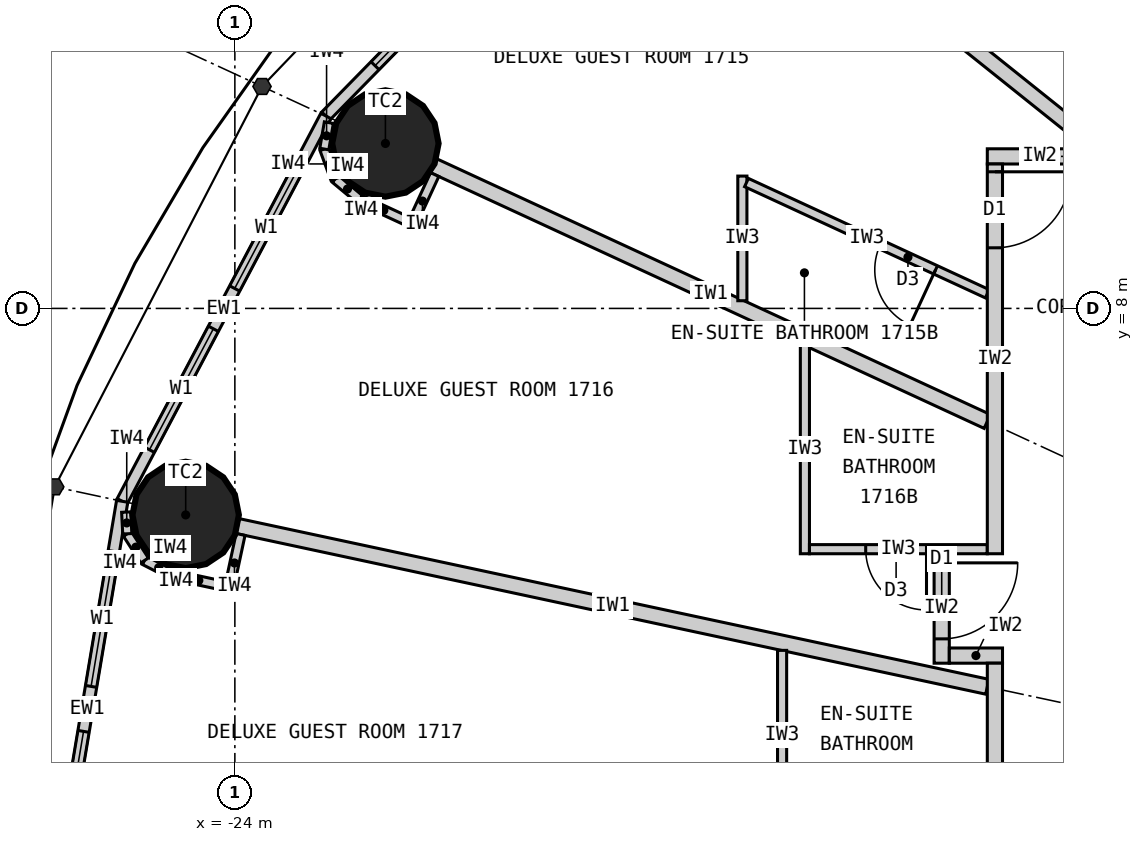
"""IFC4 building model, lengths in metres.
Left out: names, types, materials, properties, quantities, classifications, styles, units other than length and angle.
Written with IfcOpenShell. Run it as: python <this file> out.ifc"""

import sys

from ifc_helpers import new_model, si_unit, direction, frame, frame_2d, origin, origin_2d, place, context, subcontext, project, spatial, rectangle, circle, extrude, element, fill, save


model = new_model("IFC4")
c1 = context("Model", 3, precision=1e-05, world=origin(), true_north=direction((0.0, 1.0)))
c2 = subcontext(c1, "Body", "Model", "MODEL_VIEW")
j1 = project(units=[si_unit("LENGTHUNIT", "METRE"), si_unit("PLANEANGLEUNIT", "RADIAN")], contexts=[c1])
p1 = place(None, origin())
s1 = spatial("IfcSite", under=j1, at=p1, CompositionType="ELEMENT")
p2 = place(p1, origin())
s2 = spatial("IfcBuilding", under=s1, at=p2, CompositionType="ELEMENT")
p3 = place(p2, frame((0.0, 0.0, 70.5)))
s3 = spatial("IfcBuildingStorey", under=s2, at=p3, CompositionType="ELEMENT", Elevation=70.5)
for number, where, z_axis, x_axis in (
    (1, (-22.019, 10.17, 0.0), (0.0, 0.0, 1.0), (1.0, 0.0, 0.0)),
    (2, (-24.647, 5.283, 0.0), (0.0, 0.0, 1.0), (1.0, 0.0, 0.0)),
):
    element("IfcColumn", number, at=place(p3, frame(where, z_axis=z_axis, x_axis=x_axis)), inside=s3, PredefinedType="COLUMN", context=c2, shape_type="SweptSolid", body=[
        extrude(circle(Radius=0.7, at=origin_2d()), origin(), (0.0, 0.0, 1.0), 3.3),
    ])
p4 = place(p3, frame((-18.57, 14.856, 0.0), z_axis=(0.0, 0.0, 1.0), x_axis=(-0.699602905915, -0.714531856557, 0.0)))
e3 = element("IfcWall", 3, at=p4, inside=s3, PredefinedType="ELEMENTEDWALL", context=c2, shape_type="SweptSolid", body=[
    extrude(rectangle(XDim=6.051, YDim=0.15, at=frame_2d((3.025, 0.0))), origin(), (0.0, 0.0, 1.0), 3.12),
])
p5 = place(p4, frame((0.926, 0.0, 0.9)))
e4 = element("IfcOpeningElement", 4, at=p5, cuts=e3, PredefinedType="OPENING", context=c2, shape_type="SweptSolid", body=[
    extrude(rectangle(XDim=1.8, YDim=1.9, at=frame_2d((0.9, 0.95))), frame((0.0, 0.085, 0.0), z_axis=(0.0, -1.0, 0.0), x_axis=(1.0, 0.0, 0.0)), (0.0, 0.0, 1.0), 0.17),
])
p6 = place(p4, frame((3.325, 0.0, 0.9)))
e5 = element("IfcOpeningElement", 5, at=p6, cuts=e3, PredefinedType="OPENING", context=c2, shape_type="SweptSolid", body=[
    extrude(rectangle(XDim=1.8, YDim=1.9, at=frame_2d((0.9, 0.95))), frame((0.0, 0.085, 0.0), z_axis=(0.0, -1.0, 0.0), x_axis=(1.0, 0.0, 0.0)), (0.0, 0.0, 1.0), 0.17),
])
p7 = place(p3, frame((-22.803, 10.532, 0.0), z_axis=(0.0, 0.0, 1.0), x_axis=(-0.467296867008, -0.884100468321, 0.0)))
e6 = element("IfcWall", 6, at=p7, inside=s3, PredefinedType="ELEMENTEDWALL", context=c2, shape_type="SweptSolid", body=[
    extrude(rectangle(XDim=5.734, YDim=0.15, at=frame_2d((2.867, 0.0))), origin(), (0.0, 0.0, 1.0), 3.12),
])
p8 = place(p7, frame((0.767, 0.0, 0.9)))
e7 = element("IfcOpeningElement", 7, at=p8, cuts=e6, PredefinedType="OPENING", context=c2, shape_type="SweptSolid", body=[
    extrude(rectangle(XDim=1.8, YDim=1.9, at=frame_2d((0.9, 0.95))), frame((0.0, 0.085, 0.0), z_axis=(0.0, -1.0, 0.0), x_axis=(1.0, 0.0, 0.0)), (0.0, 0.0, 1.0), 0.17),
])
p9 = place(p7, frame((3.167, 0.0, 0.9)))
e8 = element("IfcOpeningElement", 8, at=p9, cuts=e6, PredefinedType="OPENING", context=c2, shape_type="SweptSolid", body=[
    extrude(rectangle(XDim=1.8, YDim=1.9, at=frame_2d((0.9, 0.95))), frame((0.0, 0.085, 0.0), z_axis=(0.0, -1.0, 0.0), x_axis=(1.0, 0.0, 0.0)), (0.0, 0.0, 1.0), 0.17),
])
p10 = place(p3, frame((-25.482, 5.462, 0.0), z_axis=(0.0, 0.0, 1.0), x_axis=(-0.165642551694, -0.986185857264, 0.0)))
e9 = element("IfcWall", 9, at=p10, inside=s3, PredefinedType="ELEMENTEDWALL", context=c2, shape_type="SweptSolid", body=[
    extrude(rectangle(XDim=5.539, YDim=0.15, at=frame_2d((2.77, 0.0))), origin(), (0.0, 0.0, 1.0), 3.12),
])
p11 = place(p10, frame((0.669, 0.0, 0.9)))
e10 = element("IfcOpeningElement", 10, at=p11, cuts=e9, PredefinedType="OPENING", context=c2, shape_type="SweptSolid", body=[
    extrude(rectangle(XDim=1.8, YDim=1.9, at=frame_2d((0.9, 0.95))), frame((0.0, 0.085, 0.0), z_axis=(0.0, -1.0, 0.0), x_axis=(1.0, 0.0, 0.0)), (0.0, 0.0, 1.0), 0.17),
])
p12 = place(p10, frame((3.07, 0.0, 0.9)))
e11 = element("IfcOpeningElement", 11, at=p12, cuts=e9, PredefinedType="OPENING", context=c2, shape_type="SweptSolid", body=[
    extrude(rectangle(XDim=1.8, YDim=1.9, at=frame_2d((0.9, 0.95))), frame((0.0, 0.085, 0.0), z_axis=(0.0, -1.0, 0.0), x_axis=(1.0, 0.0, 0.0)), (0.0, 0.0, 1.0), 0.17),
])
p13 = place(p3, frame((-12.625, 10.1, 0.0), z_axis=(0.0, 0.0, 1.0), x_axis=(-0.780892451574, 0.624665493744, 0.0)))
e12 = element("IfcWall", 12, at=p13, inside=s3, PredefinedType="PARTITIONING", context=c2, shape_type="SweptSolid", body=[
    extrude(rectangle(XDim=6.045, YDim=0.2, at=frame_2d((3.022, 0.0))), origin(), (0.0, 0.0, 1.0), 2.32),
])
p14 = place(p3, frame((-14.1, 6.512, 0.0), z_axis=(0.0, 0.0, 1.0), x_axis=(-0.907832871056, 0.419332181247, 0.0)))
e13 = element("IfcWall", 13, at=p14, inside=s3, PredefinedType="PARTITIONING", context=c2, shape_type="SweptSolid", body=[
    extrude(rectangle(XDim=8.023, YDim=0.2, at=frame_2d((4.011, 0.0))), origin(), (0.0, 0.0, 1.0), 2.32),
])
p15 = place(p3, frame((-14.1, 3.022, 0.0), z_axis=(0.0, 0.0, 1.0), x_axis=(-0.977790014929, 0.209586943072, 0.0)))
e14 = element("IfcWall", 14, at=p15, inside=s3, PredefinedType="PARTITIONING", context=c2, shape_type="SweptSolid", body=[
    extrude(rectangle(XDim=10.087, YDim=0.2, at=frame_2d((5.043, 0.0))), origin(), (0.0, 0.0, 1.0), 2.32),
])
p16 = place(p3, frame((-17.323, 8.101, 0.0), z_axis=(0.0, 0.0, 1.0), x_axis=(0.0, 1.0, 0.0)))
e15 = element("IfcWall", 15, at=p16, inside=s3, PredefinedType="PARTITIONING", context=c2, shape_type="SweptSolid", body=[
    extrude(rectangle(XDim=1.64, YDim=0.12, at=frame_2d((0.82, 0.0))), origin(), (0.0, 0.0, 1.0), 3.12),
])
p17 = place(p3, frame((-14.1, 8.193, 0.0), z_axis=(0.0, 0.0, 1.0), x_axis=(-0.907836493557, 0.419324338628, 0.0)))
e16 = element("IfcWall", 16, at=p17, inside=s3, PredefinedType="PARTITIONING", context=c2, shape_type="SweptSolid", body=[
    extrude(rectangle(XDim=3.49, YDim=0.12, at=frame_2d((1.745, 0.0))), origin(), (0.0, 0.0, 1.0), 3.12),
])
p18 = place(p17, frame((0.75, 0.0, 0.0)))
e17 = element("IfcOpeningElement", 17, at=p18, cuts=e16, PredefinedType="OPENING", context=c2, shape_type="SweptSolid", body=[
    extrude(rectangle(XDim=0.8, YDim=2.1, at=frame_2d((0.4, 1.05))), frame((0.0, 0.07, 0.0), z_axis=(0.0, -1.0, 0.0), x_axis=(1.0, 0.0, 0.0)), (0.0, 0.0, 1.0), 0.14),
])
p19 = place(p3, frame((-16.5, 7.521, 0.0), z_axis=(0.0, 0.0, 1.0), x_axis=(0.0, -1.0, 0.0)))
e18 = element("IfcWall", 18, at=p19, inside=s3, PredefinedType="PARTITIONING", context=c2, shape_type="SweptSolid", body=[
    extrude(rectangle(XDim=2.749, YDim=0.12, at=frame_2d((1.374, 0.0))), origin(), (0.0, 0.0, 1.0), 3.12),
])
p20 = place(p3, frame((-14.1, 4.833, 0.0), z_axis=(0.0, 0.0, 1.0), x_axis=(-1.0, 0.0, 0.0)))
e19 = element("IfcWall", 19, at=p20, inside=s3, PredefinedType="PARTITIONING", context=c2, shape_type="SweptSolid", body=[
    extrude(rectangle(XDim=2.34, YDim=0.12, at=frame_2d((1.17, 0.0))), origin(), (0.0, 0.0, 1.0), 3.12),
])
p21 = place(p20, frame((0.8, 0.0, 0.0)))
e20 = element("IfcOpeningElement", 20, at=p21, cuts=e19, PredefinedType="OPENING", context=c2, shape_type="SweptSolid", body=[
    extrude(rectangle(XDim=0.8, YDim=2.1, at=frame_2d((0.4, 1.05))), frame((0.0, 0.07, 0.0), z_axis=(0.0, -1.0, 0.0), x_axis=(1.0, 0.0, 0.0)), (0.0, 0.0, 1.0), 0.14),
])
p22 = place(p3, frame((-16.8, 3.501, 0.0), z_axis=(0.0, 0.0, 1.0), x_axis=(0.0, -1.0, 0.0)))
e21 = element("IfcWall", 21, at=p22, inside=s3, PredefinedType="PARTITIONING", context=c2, shape_type="SweptSolid", body=[
    extrude(rectangle(XDim=2.219, YDim=0.12, at=frame_2d((1.109, 0.0))), origin(), (0.0, 0.0, 1.0), 3.12),
])
p23 = place(p3, frame((-14.7, 4.772, 0.0), z_axis=(0.0, 0.0, 1.0), x_axis=(0.0, -1.0, 0.0)))
e22 = element("IfcWall", 22, at=p23, inside=s3, PredefinedType="PARTITIONING", context=c2, shape_type="SweptSolid", body=[
    extrude(rectangle(XDim=1.44, YDim=0.2, at=frame_2d((0.72, 0.0))), origin(), (0.0, 0.0, 1.0), 3.12),
])
p24 = place(p23, frame((0.12, 0.0, 0.0)))
e23 = element("IfcOpeningElement", 23, at=p24, cuts=e22, PredefinedType="OPENING", context=c2, shape_type="SweptSolid", body=[
    extrude(rectangle(XDim=1.0, YDim=2.2, at=frame_2d((0.5, 1.1))), frame((0.0, 0.11, 0.0), z_axis=(0.0, -1.0, 0.0), x_axis=(1.0, 0.0, 0.0)), (0.0, 0.0, 1.0), 0.22),
])
p25 = place(p3, frame((-13.9, 3.433, 0.0), z_axis=(0.0, 0.0, 1.0), x_axis=(-1.0, 0.0, 0.0)))
e24 = element("IfcWall", 24, at=p25, inside=s3, PredefinedType="PARTITIONING", context=c2, shape_type="SweptSolid", body=[
    extrude(rectangle(XDim=0.7, YDim=0.2, at=frame_2d((0.35, 0.0))), origin(), (0.0, 0.0, 1.0), 2.32),
])
p26 = place(p3, frame((-14.1, 10.0, 0.0), z_axis=(0.0, 0.0, 1.0), x_axis=(1.0, 0.0, 0.0)))
e25 = element("IfcWall", 25, at=p26, inside=s3, PredefinedType="PARTITIONING", context=c2, shape_type="SweptSolid", body=[
    extrude(rectangle(XDim=2.481, YDim=0.2, at=frame_2d((1.24, 0.0))), origin(), (0.0, 0.0, 1.0), 3.12),
])
p27 = place(p3, frame((-14.0, 9.9, 0.0), z_axis=(0.0, 0.0, 1.0), x_axis=(0.0, -1.0, 0.0)))
e26 = element("IfcWall", 26, at=p27, inside=s3, PredefinedType="PARTITIONING", context=c2, shape_type="SweptSolid", body=[
    extrude(rectangle(XDim=5.127, YDim=0.2, at=frame_2d((2.564, 0.0))), origin(), (0.0, 0.0, 1.0), 3.12),
])
p28 = place(p27, frame((0.103, 0.0, 0.0)))
e27 = element("IfcOpeningElement", 27, at=p28, cuts=e26, PredefinedType="OPENING", context=c2, shape_type="SweptSolid", body=[
    extrude(rectangle(XDim=1.0, YDim=2.2, at=frame_2d((0.5, 1.1))), frame((0.0, 0.11, 0.0), z_axis=(0.0, -1.0, 0.0), x_axis=(1.0, 0.0, 0.0)), (0.0, 0.0, 1.0), 0.22),
])
p29 = place(p3, frame((-14.0, 3.333, 0.0), z_axis=(0.0, 0.0, 1.0), x_axis=(0.0, -1.0, 0.0)))
e28 = element("IfcWall", 28, at=p29, inside=s3, PredefinedType="PARTITIONING", context=c2, shape_type="SweptSolid", body=[
    extrude(rectangle(XDim=6.665, YDim=0.2, at=frame_2d((3.333, 0.0))), origin(), (0.0, 0.0, 1.0), 3.12),
])
p30 = place(p29, frame((2.15, 0.0, 0.0)))
e29 = element("IfcOpeningElement", 29, at=p30, cuts=e28, PredefinedType="OPENING", context=c2, shape_type="SweptSolid", body=[
    extrude(rectangle(XDim=1.0, YDim=2.2, at=frame_2d((0.5, 1.1))), frame((0.0, 0.11, 0.0), z_axis=(0.0, -1.0, 0.0), x_axis=(1.0, 0.0, 0.0)), (0.0, 0.0, 1.0), 0.22),
])
p31 = place(p29, frame((5.173, 0.0, 0.0)))
e30 = element("IfcOpeningElement", 30, at=p31, cuts=e28, PredefinedType="OPENING", context=c2, shape_type="SweptSolid", body=[
    extrude(rectangle(XDim=1.0, YDim=2.2, at=frame_2d((0.5, 1.1))), frame((0.0, 0.11, 0.0), z_axis=(0.0, -1.0, 0.0), x_axis=(1.0, 0.0, 0.0)), (0.0, 0.0, 1.0), 0.22),
])
p32 = place(p3, frame((-21.371, 9.761, 0.0), z_axis=(0.0, 0.0, 1.0), x_axis=(-0.419259891039, -0.907866258744, 0.0)))
e31 = element("IfcWall", 31, at=p32, inside=s3, PredefinedType="PARTITIONING", context=c2, shape_type="SweptSolid", body=[
    extrude(rectangle(XDim=0.768, YDim=0.12, at=frame_2d((0.384, 0.0))), origin(), (0.0, 0.0, 1.0), 3.12),
])
p33 = place(p3, frame((-21.722, 9.144, 0.0), z_axis=(0.0, 0.0, 1.0), x_axis=(-0.907877701396, 0.419235112208, 0.0)))
e32 = element("IfcWall", 32, at=p33, inside=s3, PredefinedType="PARTITIONING", context=c2, shape_type="SweptSolid", body=[
    extrude(rectangle(XDim=0.7, YDim=0.12, at=frame_2d((0.35, 0.0))), origin(), (0.0, 0.0, 1.0), 3.12),
])
p34 = place(p3, frame((-22.358, 9.437, 0.0), z_axis=(0.0, 0.0, 1.0), x_axis=(-0.768412687942, 0.639954639806, 0.0)))
e33 = element("IfcWall", 33, at=p34, inside=s3, PredefinedType="PARTITIONING", context=c2, shape_type="SweptSolid", body=[
    extrude(rectangle(XDim=0.418, YDim=0.12, at=frame_2d((0.209, 0.0))), origin(), (0.0, 0.0, 1.0), 3.12),
])
p35 = place(p3, frame((-22.679, 9.705, 0.0), z_axis=(0.0, 0.0, 1.0), x_axis=(-0.345164001646, 0.938542386879, 0.0)))
e34 = element("IfcWall", 34, at=p35, inside=s3, PredefinedType="PARTITIONING", context=c2, shape_type="SweptSolid", body=[
    extrude(rectangle(XDim=0.418, YDim=0.12, at=frame_2d((0.209, 0.0))), origin(), (0.0, 0.0, 1.0), 3.12),
])
p36 = place(p3, frame((-22.823, 10.097, 0.0), z_axis=(0.0, 0.0, 1.0), x_axis=(0.169674995186, 0.985500074079, 0.0)))
e35 = element("IfcWall", 35, at=p36, inside=s3, PredefinedType="PARTITIONING", context=c2, shape_type="SweptSolid", body=[
    extrude(rectangle(XDim=0.353, YDim=0.12, at=frame_2d((0.176, 0.0))), origin(), (0.0, 0.0, 1.0), 3.12),
])
p37 = place(p3, frame((-23.925, 5.026, 0.0), z_axis=(0.0, 0.0, 1.0), x_axis=(-0.209681192172, -0.977769808109, 0.0)))
e36 = element("IfcWall", 36, at=p37, inside=s3, PredefinedType="PARTITIONING", context=c2, shape_type="SweptSolid", body=[
    extrude(rectangle(XDim=0.767, YDim=0.12, at=frame_2d((0.384, 0.0))), origin(), (0.0, 0.0, 1.0), 3.12),
])
p38 = place(p3, frame((-24.132, 4.347, 0.0), z_axis=(0.0, 0.0, 1.0), x_axis=(-0.977776882509, 0.209648200638, 0.0)))
e37 = element("IfcWall", 37, at=p38, inside=s3, PredefinedType="PARTITIONING", context=c2, shape_type="SweptSolid", body=[
    extrude(rectangle(XDim=0.7, YDim=0.12, at=frame_2d((0.35, 0.0))), origin(), (0.0, 0.0, 1.0), 3.12),
])
for number, where, z_axis, x_axis in (
    (38, (-24.816, 4.494, 0.0), (0.0, 0.0, 1.0), (-0.89, 0.455, 0.0)),
    (39, (-25.188, 4.684, 0.0), (0.0, 0.0, 1.0), (-0.543, 0.84, 0.0)),
):
    element("IfcWall", number, at=place(p3, frame(where, z_axis=z_axis, x_axis=x_axis)), inside=s3, PredefinedType="PARTITIONING", context=c2, shape_type="SweptSolid", body=[
        extrude(rectangle(XDim=0.418, YDim=0.12, at=frame_2d((0.209, 0.0))), origin(), (0.0, 0.0, 1.0), 3.12),
    ])
p39 = place(p3, frame((-25.416, 5.035, 0.0), z_axis=(0.0, 0.0, 1.0), x_axis=(-0.050406329159, 0.998728793007, 0.0)))
e40 = element("IfcWall", 40, at=p39, inside=s3, PredefinedType="PARTITIONING", context=c2, shape_type="SweptSolid", body=[
    extrude(rectangle(XDim=0.286, YDim=0.12, at=frame_2d((0.143, 0.0))), origin(), (0.0, 0.0, 1.0), 3.12),
])
p40 = place(p6, origin())
e41 = element("IfcWindow", 41, at=p40, inside=s3, PartitioningType="SINGLE_PANEL", PredefinedType="WINDOW", context=c2, shape_type="SweptSolid", body=[
    extrude(rectangle(XDim=1.8, YDim=1.9, at=frame_2d((0.9, 0.95))), frame((0.0, 0.03, 0.0), z_axis=(0.0, -1.0, 0.0), x_axis=(1.0, 0.0, 0.0)), (0.0, 0.0, 1.0), 0.06),
])
fill(e5, e41)
p41 = place(p8, origin())
e42 = element("IfcWindow", 42, at=p41, inside=s3, PartitioningType="SINGLE_PANEL", PredefinedType="WINDOW", context=c2, shape_type="SweptSolid", body=[
    extrude(rectangle(XDim=1.8, YDim=1.9, at=frame_2d((0.9, 0.95))), frame((0.0, 0.03, 0.0), z_axis=(0.0, -1.0, 0.0), x_axis=(1.0, 0.0, 0.0)), (0.0, 0.0, 1.0), 0.06),
])
fill(e7, e42)
p42 = place(p9, origin())
e43 = element("IfcWindow", 43, at=p42, inside=s3, PartitioningType="SINGLE_PANEL", PredefinedType="WINDOW", context=c2, shape_type="SweptSolid", body=[
    extrude(rectangle(XDim=1.8, YDim=1.9, at=frame_2d((0.9, 0.95))), frame((0.0, 0.03, 0.0), z_axis=(0.0, -1.0, 0.0), x_axis=(1.0, 0.0, 0.0)), (0.0, 0.0, 1.0), 0.06),
])
fill(e8, e43)
p43 = place(p11, origin())
e44 = element("IfcWindow", 44, at=p43, inside=s3, PartitioningType="SINGLE_PANEL", PredefinedType="WINDOW", context=c2, shape_type="SweptSolid", body=[
    extrude(rectangle(XDim=1.8, YDim=1.9, at=frame_2d((0.9, 0.95))), frame((0.0, 0.03, 0.0), z_axis=(0.0, -1.0, 0.0), x_axis=(1.0, 0.0, 0.0)), (0.0, 0.0, 1.0), 0.06),
])
fill(e10, e44)
p44 = place(p12, origin())
e45 = element("IfcWindow", 45, at=p44, inside=s3, PartitioningType="SINGLE_PANEL", PredefinedType="WINDOW", context=c2, shape_type="SweptSolid", body=[
    extrude(rectangle(XDim=1.8, YDim=1.9, at=frame_2d((0.9, 0.95))), frame((0.0, 0.03, 0.0), z_axis=(0.0, -1.0, 0.0), x_axis=(1.0, 0.0, 0.0)), (0.0, 0.0, 1.0), 0.06),
])
fill(e11, e45)
p45 = place(p18, origin())
e46 = element("IfcDoor", 46, at=p45, inside=s3, OperationType="SINGLE_SWING_LEFT", PredefinedType="DOOR", context=c2, shape_type="SweptSolid", body=[
    extrude(rectangle(XDim=0.8, YDim=2.1, at=frame_2d((0.4, 1.05))), frame((0.0, 0.025, 0.0), z_axis=(0.0, -1.0, 0.0), x_axis=(1.0, 0.0, 0.0)), (0.0, 0.0, 1.0), 0.05),
])
fill(e17, e46)
p46 = place(p28, origin())
e47 = element("IfcDoor", 47, at=p46, inside=s3, OperationType="SINGLE_SWING_LEFT", PredefinedType="DOOR", context=c2, shape_type="SweptSolid", body=[
    extrude(rectangle(XDim=1.0, YDim=2.2, at=frame_2d((0.5, 1.1))), frame((0.0, 0.025, 0.0), z_axis=(0.0, -1.0, 0.0), x_axis=(1.0, 0.0, 0.0)), (0.0, 0.0, 1.0), 0.05),
])
fill(e27, e47)
p47 = place(p21, origin())
e48 = element("IfcDoor", 48, at=p47, inside=s3, OperationType="SINGLE_SWING_LEFT", PredefinedType="DOOR", context=c2, shape_type="SweptSolid", body=[
    extrude(rectangle(XDim=0.8, YDim=2.1, at=frame_2d((0.4, 1.05))), frame((0.0, 0.025, 0.0), z_axis=(0.0, -1.0, 0.0), x_axis=(1.0, 0.0, 0.0)), (0.0, 0.0, 1.0), 0.05),
])
fill(e20, e48)
p48 = place(p24, origin())
e49 = element("IfcDoor", 49, at=p48, inside=s3, OperationType="SINGLE_SWING_LEFT", PredefinedType="DOOR", context=c2, shape_type="SweptSolid", body=[
    extrude(rectangle(XDim=1.0, YDim=2.2, at=frame_2d((0.5, 1.1))), frame((0.0, 0.025, 0.0), z_axis=(0.0, -1.0, 0.0), x_axis=(1.0, 0.0, 0.0)), (0.0, 0.0, 1.0), 0.05),
])
fill(e23, e49)
save(model, sys.argv[1])
